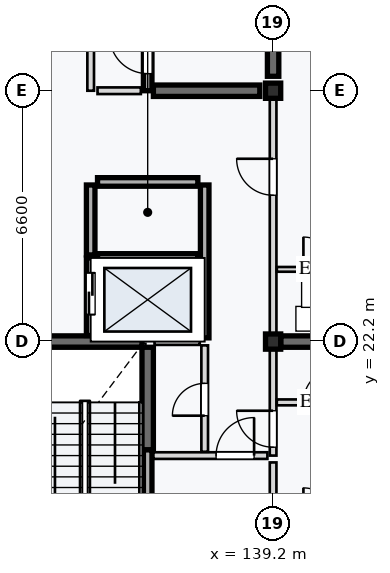
"""IFC4 building model, lengths in metres.
Left out: names, types, materials, properties, quantities, classifications, styles, units other than length and angle.
Written with IfcOpenShell. Run it as: python <this file> out.ifc"""

import sys

from ifc_helpers import new_model, si_unit, direction, frame, frame_2d, origin, origin_2d, place, context, subcontext, project, spatial, rectangle, extrude, element, fill, save


model = new_model("IFC4")
c1 = context("Model", 3, precision=1e-05, world=origin(), true_north=direction((0.0, 1.0)))
c2 = subcontext(c1, "Body", "Model", "MODEL_VIEW")
j1 = project(units=[si_unit("LENGTHUNIT", "METRE"), si_unit("PLANEANGLEUNIT", "RADIAN")], contexts=[c1])
p1 = place(None, origin())
s1 = spatial("IfcSite", under=j1, at=p1, CompositionType="ELEMENT")
p2 = place(p1, origin())
s2 = spatial("IfcBuilding", under=s1, at=p2, CompositionType="ELEMENT")
p3 = place(p2, frame((0.0, 0.0, 30.8)))
s3 = spatial("IfcBuildingStorey", under=s2, at=p3, CompositionType="ELEMENT", Elevation=30.8)
for number, where, z_axis, x_axis in (
    (1, (139.2, 22.2, 0.0), (0.0, 0.0, 1.0), (1.0, 0.0, 0.0)),
    (2, (139.2, 28.8, 0.0), (0.0, 0.0, 1.0), (1.0, 0.0, 0.0)),
):
    element("IfcColumn", number, at=place(p3, frame(where, z_axis=z_axis, x_axis=x_axis)), inside=s3, PredefinedType="COLUMN", context=c2, shape_type="SweptSolid", body=[
        extrude(rectangle(XDim=0.4, YDim=0.4, at=origin_2d()), origin(), (0.0, 0.0, 1.0), 3.2),
    ])
p4 = place(p3, frame((135.9, 19.35, 0.0), z_axis=(0.0, 0.0, 1.0), x_axis=(0.0, 1.0, 0.0)))
e3 = element("IfcWall", 3, at=p4, inside=s3, PredefinedType="SHEAR", context=c2, shape_type="SweptSolid", body=[
    extrude(rectangle(XDim=2.7, YDim=0.3, at=frame_2d((1.35, 0.0))), origin(), (0.0, 0.0, 1.0), 2.97),
])
p5 = place(p3, frame((132.95, 22.2, 0.0), z_axis=(0.0, 0.0, 1.0), x_axis=(1.0, 0.0, 0.0)))
e4 = element("IfcWall", 4, at=p5, inside=s3, PredefinedType="SHEAR", context=c2, shape_type="SweptSolid", body=[
    extrude(rectangle(XDim=2.8, YDim=0.3, at=frame_2d((1.4, 0.0))), origin(), (0.0, 0.0, 1.0), 2.97),
])
p6 = place(p3, frame((139.2, 29.18, 0.0), z_axis=(0.0, 0.0, 1.0), x_axis=(0.0, 1.0, 0.0)))
e5 = element("IfcWall", 5, at=p6, inside=s3, PredefinedType="SHEAR", context=c2, shape_type="SweptSolid", body=[
    extrude(rectangle(XDim=5.84, YDim=0.3, at=frame_2d((2.92, 0.0))), origin(), (0.0, 0.0, 1.0), 2.97),
])
p7 = place(p3, frame((136.05, 28.8, 0.0), z_axis=(0.0, 0.0, 1.0), x_axis=(1.0, 0.0, 0.0)))
e6 = element("IfcWall", 6, at=p7, inside=s3, PredefinedType="SHEAR", context=c2, shape_type="SweptSolid", body=[
    extrude(rectangle(XDim=2.8, YDim=0.3, at=frame_2d((1.4, 0.0))), origin(), (0.0, 0.0, 1.0), 2.97),
])
p8 = place(p3, frame((139.4, 22.2, 0.0), z_axis=(0.0, 0.0, 1.0), x_axis=(1.0, 0.0, 0.0)))
e7 = element("IfcWall", 7, at=p8, inside=s3, PredefinedType="SHEAR", context=c2, shape_type="SweptSolid", body=[
    extrude(rectangle(XDim=6.2, YDim=0.3, at=frame_2d((3.1, 0.0))), origin(), (0.0, 0.0, 1.0), 2.97),
])
p9 = place(p3, frame((135.9, 15.75, 0.0), z_axis=(0.0, 0.0, 1.0), x_axis=(0.0, 1.0, 0.0)))
e8 = element("IfcWall", 8, at=p9, inside=s3, PredefinedType="STANDARD", context=c2, shape_type="SweptSolid", body=[
    extrude(rectangle(XDim=3.6, YDim=0.225, at=frame_2d((1.8, 0.0))), origin(), (0.0, 0.0, 1.0), 2.97),
])
p10 = place(p9, frame((0.45, 0.0, 0.0)))
e9 = element("IfcOpeningElement", 9, at=p10, cuts=e8, PredefinedType="OPENING", context=c2, shape_type="SweptSolid", body=[
    extrude(rectangle(XDim=1.0, YDim=2.1, at=frame_2d((0.5, 1.05))), frame((0.0, 0.123, 0.0), z_axis=(0.0, -1.0, 0.0), x_axis=(1.0, 0.0, 0.0)), (0.0, 0.0, 1.0), 0.245),
])
p11 = place(p3, frame((136.05, 19.2, 0.0), z_axis=(0.0, 0.0, 1.0), x_axis=(1.0, 0.0, 0.0)))
e10 = element("IfcWall", 10, at=p11, inside=s3, PredefinedType="PARTITIONING", context=c2, shape_type="SweptSolid", body=[
    extrude(rectangle(XDim=3.0, YDim=0.175, at=frame_2d((1.5, 0.0))), origin(), (0.0, 0.0, 1.0), 2.97),
])
p12 = place(p11, frame((1.65, 0.0, 0.0)))
e11 = element("IfcOpeningElement", 11, at=p12, cuts=e10, PredefinedType="OPENING", context=c2, shape_type="SweptSolid", body=[
    extrude(rectangle(XDim=1.0, YDim=2.16, at=frame_2d((0.5, 1.08))), frame((0.0, 0.097, 0.0), z_axis=(0.0, -1.0, 0.0), x_axis=(1.0, 0.0, 0.0)), (0.0, 0.0, 1.0), 0.195),
])
p13 = place(p3, frame((137.4, 19.3, 0.0), z_axis=(0.0, 0.0, 1.0), x_axis=(0.0, 1.0, 0.0)))
e12 = element("IfcWall", 12, at=p13, inside=s3, PredefinedType="PARTITIONING", context=c2, shape_type="SweptSolid", body=[
    extrude(rectangle(XDim=2.8, YDim=0.175, at=frame_2d((1.4, 0.0))), origin(), (0.0, 0.0, 1.0), 2.97),
])
p14 = place(p13, frame((0.95, 0.0, 0.0)))
e13 = element("IfcOpeningElement", 13, at=p14, cuts=e12, PredefinedType="OPENING", context=c2, shape_type="SweptSolid", body=[
    extrude(rectangle(XDim=0.85, YDim=2.0, at=frame_2d((0.425, 1.0))), frame((0.0, 0.097, 0.0), z_axis=(0.0, -1.0, 0.0), x_axis=(1.0, 0.0, 0.0)), (0.0, 0.0, 1.0), 0.195),
])
p15 = place(p3, frame((136.08, 22.2, 0.0), z_axis=(0.0, 0.0, 1.0), x_axis=(1.0, 0.0, 0.0)))
e14 = element("IfcWall", 14, at=p15, inside=s3, PredefinedType="PARTITIONING", context=c2, shape_type="SweptSolid", body=[
    extrude(rectangle(XDim=1.19, YDim=0.175, at=frame_2d((0.595, 0.0))), origin(), (0.0, 0.0, 1.0), 2.97),
])
p16 = place(p3, frame((134.4, 22.36, 0.0), z_axis=(0.0, 0.0, 1.0), x_axis=(0.0, 1.0, 0.0)))
e15 = element("IfcWall", 15, at=p16, inside=s3, PredefinedType="STANDARD", context=c2, shape_type="SweptSolid", body=[
    extrude(rectangle(XDim=2.04, YDim=0.225, at=frame_2d((1.02, 0.0))), origin(), (0.0, 0.0, 1.0), 2.97),
])
p17 = place(p16, frame((0.55, 0.0, 0.0)))
e16 = element("IfcOpeningElement", 16, at=p17, cuts=e15, PredefinedType="OPENING", context=c2, shape_type="SweptSolid", body=[
    extrude(rectangle(XDim=1.1, YDim=2.1, at=frame_2d((0.55, 1.05))), frame((0.0, 0.123, 0.0), z_axis=(0.0, -1.0, 0.0), x_axis=(1.0, 0.0, 0.0)), (0.0, 0.0, 1.0), 0.245),
])
p18 = place(p3, frame((134.4, 24.48, 0.0), z_axis=(0.0, 0.0, 1.0), x_axis=(0.0, 1.0, 0.0)))
e17 = element("IfcWall", 17, at=p18, inside=s3, PredefinedType="STANDARD", context=c2, shape_type="SweptSolid", body=[
    extrude(rectangle(XDim=1.84, YDim=0.225, at=frame_2d((0.92, 0.0))), origin(), (0.0, 0.0, 1.0), 2.97),
])
p19 = place(p3, frame((137.4, 22.298, 0.0), z_axis=(0.0, 0.0, 1.0), x_axis=(0.0, 1.0, 0.0)))
e18 = element("IfcWall", 18, at=p19, inside=s3, PredefinedType="STANDARD", context=c2, shape_type="SweptSolid", body=[
    extrude(rectangle(XDim=4.022, YDim=0.225, at=frame_2d((2.011, 0.0))), origin(), (0.0, 0.0, 1.0), 2.97),
])
for number, where, z_axis, x_axis in (
    (19, (134.58, 24.4, 0.0), (0.0, 0.0, 1.0), (1.0, 0.0, 0.0)),
    (20, (134.58, 26.4, 0.0), (0.0, 0.0, 1.0), (1.0, 0.0, 0.0)),
):
    element("IfcWall", number, at=place(p3, frame(where, z_axis=z_axis, x_axis=x_axis)), inside=s3, PredefinedType="STANDARD", context=c2, shape_type="SweptSolid", body=[
        extrude(rectangle(XDim=2.64, YDim=0.225, at=frame_2d((1.32, 0.0))), origin(), (0.0, 0.0, 1.0), 2.97),
    ])
p20 = place(p3, frame((135.9, 28.8, 0.0), z_axis=(0.0, 0.0, 1.0), x_axis=(0.0, 1.0, 0.0)))
e21 = element("IfcWall", 21, at=p20, inside=s3, PredefinedType="STANDARD", context=c2, shape_type="SweptSolid", body=[
    extrude(rectangle(XDim=3.45, YDim=0.225, at=frame_2d((1.725, 0.0))), origin(), (0.0, 0.0, 1.0), 2.97),
])
p21 = place(p20, frame((0.45, 0.0, 0.0)))
e22 = element("IfcOpeningElement", 22, at=p21, cuts=e21, PredefinedType="OPENING", context=c2, shape_type="SweptSolid", body=[
    extrude(rectangle(XDim=1.0, YDim=2.16, at=frame_2d((0.5, 1.08))), frame((0.0, 0.123, 0.0), z_axis=(0.0, -1.0, 0.0), x_axis=(1.0, 0.0, 0.0)), (0.0, 0.0, 1.0), 0.245),
])
p22 = place(p3, frame((134.4, 28.8, 0.0), z_axis=(0.0, 0.0, 1.0), x_axis=(0.0, 1.0, 0.0)))
e23 = element("IfcWall", 23, at=p22, inside=s3, PredefinedType="PARTITIONING", context=c2, shape_type="SweptSolid", body=[
    extrude(rectangle(XDim=3.3, YDim=0.175, at=frame_2d((1.65, 0.0))), origin(), (0.0, 0.0, 1.0), 2.97),
])
p23 = place(p22, frame((1.8, 0.0, 0.0)))
e24 = element("IfcOpeningElement", 24, at=p23, cuts=e23, PredefinedType="OPENING", context=c2, shape_type="SweptSolid", body=[
    extrude(rectangle(XDim=1.04, YDim=2.12, at=frame_2d((0.52, 1.06))), frame((0.0, 0.097, 0.0), z_axis=(0.0, -1.0, 0.0), x_axis=(1.0, 0.0, 0.0)), (0.0, 0.0, 1.0), 0.195),
])
p24 = place(p3, frame((134.58, 28.8, 0.0), z_axis=(0.0, 0.0, 1.0), x_axis=(1.0, 0.0, 0.0)))
e25 = element("IfcWall", 25, at=p24, inside=s3, PredefinedType="PARTITIONING", context=c2, shape_type="SweptSolid", body=[
    extrude(rectangle(XDim=1.14, YDim=0.175, at=frame_2d((0.57, 0.0))), origin(), (0.0, 0.0, 1.0), 2.97),
])
p25 = place(p3, frame((139.2, 15.88, 0.0), z_axis=(0.0, 0.0, 1.0), x_axis=(0.0, 1.0, 0.0)))
e26 = element("IfcWall", 26, at=p25, inside=s3, PredefinedType="PARTITIONING", context=c2, shape_type="SweptSolid", body=[
    extrude(rectangle(XDim=3.14, YDim=0.175, at=frame_2d((1.57, 0.0))), origin(), (0.0, 0.0, 1.0), 2.55),
])
p26 = place(p3, frame((139.2, 19.2, 0.0), z_axis=(0.0, 0.0, 1.0), x_axis=(0.0, 1.0, 0.0)))
e27 = element("IfcWall", 27, at=p26, inside=s3, PredefinedType="PARTITIONING", context=c2, shape_type="SweptSolid", body=[
    extrude(rectangle(XDim=3.0, YDim=0.175, at=frame_2d((1.5, 0.0))), origin(), (0.0, 0.0, 1.0), 2.55),
])
p27 = place(p26, frame((0.22, 0.0, 0.0)))
e28 = element("IfcOpeningElement", 28, at=p27, cuts=e27, PredefinedType="OPENING", context=c2, shape_type="SweptSolid", body=[
    extrude(rectangle(XDim=0.96, YDim=2.18, at=frame_2d((0.48, 1.09))), frame((0.0, 0.097, 0.0), z_axis=(0.0, -1.0, 0.0), x_axis=(1.0, 0.0, 0.0)), (0.0, 0.0, 1.0), 0.195),
])
p28 = place(p3, frame((139.298, 20.6, 0.0), z_axis=(0.0, 0.0, 1.0), x_axis=(1.0, 0.0, 0.0)))
e29 = element("IfcWall", 29, at=p28, inside=s3, PredefinedType="PARTITIONING", context=c2, shape_type="SweptSolid", body=[
    extrude(rectangle(XDim=2.302, YDim=0.155, at=frame_2d((1.151, 0.0))), origin(), (0.0, 0.0, 1.0), 2.97),
])
p29 = place(p28, frame((0.7, 0.0, 0.0)))
e30 = element("IfcOpeningElement", 30, at=p29, cuts=e29, PredefinedType="OPENING", context=c2, shape_type="SweptSolid", body=[
    extrude(rectangle(XDim=0.9, YDim=2.16, at=frame_2d((0.45, 1.08))), frame((0.0, 0.087, 0.0), z_axis=(0.0, -1.0, 0.0), x_axis=(1.0, 0.0, 0.0)), (0.0, 0.0, 1.0), 0.175),
])
p30 = place(p3, frame((139.2, 22.2, 0.0), z_axis=(0.0, 0.0, 1.0), x_axis=(0.0, 1.0, 0.0)))
e31 = element("IfcWall", 31, at=p30, inside=s3, PredefinedType="PARTITIONING", context=c2, shape_type="SweptSolid", body=[
    extrude(rectangle(XDim=6.6, YDim=0.175, at=frame_2d((3.3, 0.0))), origin(), (0.0, 0.0, 1.0), 2.55),
])
p31 = place(p30, frame((3.85, 0.0, 0.0)))
e32 = element("IfcOpeningElement", 32, at=p31, cuts=e31, PredefinedType="OPENING", context=c2, shape_type="SweptSolid", body=[
    extrude(rectangle(XDim=0.96, YDim=2.18, at=frame_2d((0.48, 1.09))), frame((0.0, 0.097, 0.0), z_axis=(0.0, -1.0, 0.0), x_axis=(1.0, 0.0, 0.0)), (0.0, 0.0, 1.0), 0.195),
])
p32 = place(p3, frame((139.298, 24.1, 0.0), z_axis=(0.0, 0.0, 1.0), x_axis=(1.0, 0.0, 0.0)))
e33 = element("IfcWall", 33, at=p32, inside=s3, PredefinedType="PARTITIONING", context=c2, shape_type="SweptSolid", body=[
    extrude(rectangle(XDim=2.302, YDim=0.125, at=frame_2d((1.151, 0.0))), origin(), (0.0, 0.0, 1.0), 2.97),
])
p33 = place(p32, frame((0.7, 0.0, 0.0)))
e34 = element("IfcOpeningElement", 34, at=p33, cuts=e33, PredefinedType="OPENING", context=c2, shape_type="SweptSolid", body=[
    extrude(rectangle(XDim=0.85, YDim=2.04, at=frame_2d((0.425, 1.02))), frame((0.0, 0.073, 0.0), z_axis=(0.0, -1.0, 0.0), x_axis=(1.0, 0.0, 0.0)), (0.0, 0.0, 1.0), 0.145),
])
p34 = place(p12, origin())
e35 = element("IfcDoor", 35, at=p34, inside=s3, OperationType="SINGLE_SWING_RIGHT", PredefinedType="DOOR", context=c2, shape_type="SweptSolid", body=[
    extrude(rectangle(XDim=1.0, YDim=2.16, at=frame_2d((0.5, 1.08))), frame((0.0, 0.025, 0.0), z_axis=(0.0, -1.0, 0.0), x_axis=(1.0, 0.0, 0.0)), (0.0, 0.0, 1.0), 0.05),
])
fill(e11, e35)
p35 = place(p14, origin())
e36 = element("IfcDoor", 36, at=p35, inside=s3, OperationType="SINGLE_SWING_LEFT", PredefinedType="DOOR", context=c2, shape_type="SweptSolid", body=[
    extrude(rectangle(XDim=0.85, YDim=2.0, at=frame_2d((0.425, 1.0))), frame((0.0, 0.025, 0.0), z_axis=(0.0, -1.0, 0.0), x_axis=(1.0, 0.0, 0.0)), (0.0, 0.0, 1.0), 0.05),
])
fill(e13, e36)
p36 = place(p17, origin())
e37 = element("IfcDoor", 37, at=p36, inside=s3, OperationType="DOUBLE_DOOR_SLIDING", PredefinedType="DOOR", context=c2, shape_type="SweptSolid", body=[
    extrude(rectangle(XDim=1.1, YDim=2.1, at=frame_2d((0.55, 1.05))), frame((0.0, 0.025, 0.0), z_axis=(0.0, -1.0, 0.0), x_axis=(1.0, 0.0, 0.0)), (0.0, 0.0, 1.0), 0.05),
])
fill(e16, e37)
p37 = place(p21, origin())
e38 = element("IfcDoor", 38, at=p37, inside=s3, OperationType="SINGLE_SWING_RIGHT", PredefinedType="DOOR", context=c2, shape_type="SweptSolid", body=[
    extrude(rectangle(XDim=1.0, YDim=2.16, at=frame_2d((0.5, 1.08))), frame((0.0, 0.025, 0.0), z_axis=(0.0, -1.0, 0.0), x_axis=(1.0, 0.0, 0.0)), (0.0, 0.0, 1.0), 0.05),
])
fill(e22, e38)
p38 = place(p27, origin())
e39 = element("IfcDoor", 39, at=p38, inside=s3, OperationType="SINGLE_SWING_RIGHT", PredefinedType="DOOR", context=c2, shape_type="SweptSolid", body=[
    extrude(rectangle(XDim=0.96, YDim=2.18, at=frame_2d((0.48, 1.09))), frame((0.0, 0.025, 0.0), z_axis=(0.0, -1.0, 0.0), x_axis=(1.0, 0.0, 0.0)), (0.0, 0.0, 1.0), 0.05),
])
fill(e28, e39)
p39 = place(p29, origin())
e40 = element("IfcDoor", 40, at=p39, inside=s3, OperationType="SINGLE_SWING_RIGHT", PredefinedType="DOOR", context=c2, shape_type="SweptSolid", body=[
    extrude(rectangle(XDim=0.9, YDim=2.16, at=frame_2d((0.45, 1.08))), frame((0.0, 0.025, 0.0), z_axis=(0.0, -1.0, 0.0), x_axis=(1.0, 0.0, 0.0)), (0.0, 0.0, 1.0), 0.05),
])
fill(e30, e40)
p40 = place(p31, origin())
e41 = element("IfcDoor", 41, at=p40, inside=s3, OperationType="SINGLE_SWING_RIGHT", PredefinedType="DOOR", context=c2, shape_type="SweptSolid", body=[
    extrude(rectangle(XDim=0.96, YDim=2.18, at=frame_2d((0.48, 1.09))), frame((0.0, 0.025, 0.0), z_axis=(0.0, -1.0, 0.0), x_axis=(1.0, 0.0, 0.0)), (0.0, 0.0, 1.0), 0.05),
])
fill(e32, e41)
p41 = place(p33, origin())
e42 = element("IfcDoor", 42, at=p41, inside=s3, OperationType="SINGLE_SWING_LEFT", PredefinedType="DOOR", context=c2, shape_type="SweptSolid", body=[
    extrude(rectangle(XDim=0.85, YDim=2.04, at=frame_2d((0.425, 1.02))), frame((0.0, 0.025, 0.0), z_axis=(0.0, -1.0, 0.0), x_axis=(1.0, 0.0, 0.0)), (0.0, 0.0, 1.0), 0.05),
])
fill(e34, e42)
save(model, sys.argv[1])
